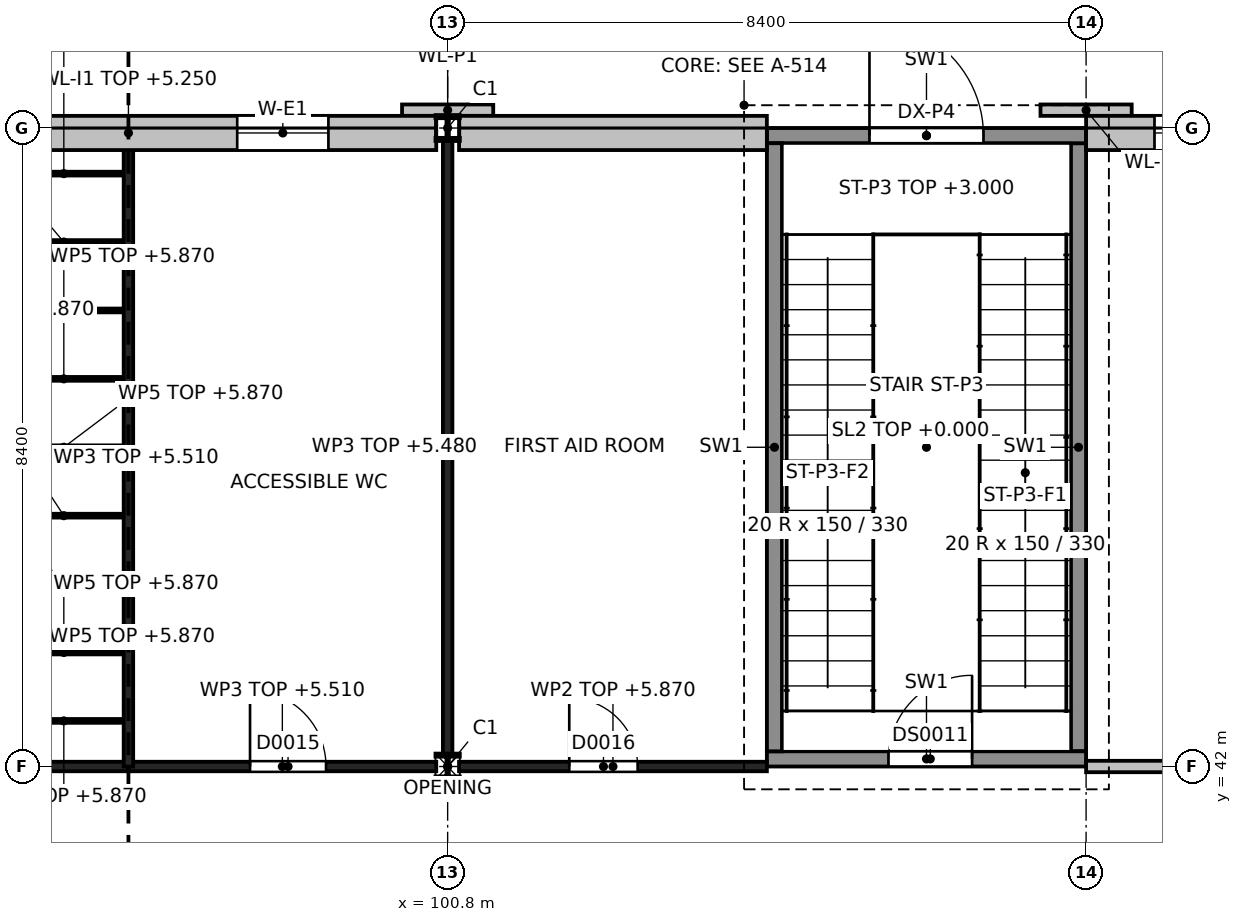
"""IFC4 building model, lengths in metres.
Left out: names, types, materials, properties, quantities, classifications, styles, units other than length and angle.
Written with IfcOpenShell. Run it as: python <this file> out.ifc"""

import sys

from ifc_helpers import new_model, si_unit, direction, frame, frame_2d, origin, origin_2d, place, context, subcontext, project, spatial, rectangle, i_section, extrude, element, fill, save


model = new_model("IFC4")
c1 = context("Model", 3, precision=1e-05, world=origin(), true_north=direction((0.0, 1.0)))
c2 = subcontext(c1, "Body", "Model", "MODEL_VIEW")
j1 = project(units=[si_unit("LENGTHUNIT", "METRE"), si_unit("PLANEANGLEUNIT", "RADIAN")], contexts=[c1])
p1 = place(None, origin())
s1 = spatial("IfcSite", under=j1, at=p1, CompositionType="ELEMENT")
p2 = place(p1, origin())
s2 = spatial("IfcBuilding", under=s1, at=p2, CompositionType="ELEMENT")
p3 = place(p2, origin())
s3 = spatial("IfcBuildingStorey", under=s2, at=p3, CompositionType="ELEMENT", Elevation=0.0)
for number, where, z_axis, x_axis in (
    (1, (100.8, 42.0, -1.35), (0.0, 0.0, 1.0), (1.0, 0.0, 0.0)),
    (2, (100.8, 50.4, -1.35), (0.0, 0.0, 1.0), (1.0, 0.0, 0.0)),
):
    element("IfcColumn", number, at=place(p3, frame(where, z_axis=z_axis, x_axis=x_axis)), inside=s3, PredefinedType="COLUMN", context=c2, shape_type="SweptSolid", body=[
        extrude(i_section(OverallWidth=0.3, OverallDepth=0.32, WebThickness=0.011, FlangeThickness=0.021, at=origin_2d()), origin(), (0.0, 0.0, 1.0), 7.35),
    ])
p4 = place(p3, frame((105.0, 42.1, -1.35), z_axis=(0.0, 0.0, 1.0), x_axis=(1.0, 0.0, 0.0)))
e3 = element("IfcWall", 3, at=p4, inside=s3, PredefinedType="SHEAR", context=c2, shape_type="SweptSolid", body=[
    extrude(rectangle(XDim=4.2, YDim=0.2, at=frame_2d((2.1, 0.0))), origin(), (0.0, 0.0, 1.0), 7.35),
])
p5 = place(p4, frame((1.6, 0.0, 1.35)))
e4 = element("IfcOpeningElement", 4, at=p5, cuts=e3, PredefinedType="OPENING", context=c2, shape_type="SweptSolid", body=[
    extrude(rectangle(XDim=1.1, YDim=2.1, at=frame_2d((0.55, 1.05))), frame((0.0, 0.1, 0.0), z_axis=(0.0, -1.0, 0.0), x_axis=(1.0, 0.0, 0.0)), (0.0, 0.0, 1.0), 0.2),
])
p6 = place(p3, frame((105.0, 50.3, -1.35), z_axis=(0.0, 0.0, 1.0), x_axis=(1.0, 0.0, 0.0)))
e5 = element("IfcWall", 5, at=p6, inside=s3, PredefinedType="SHEAR", context=c2, shape_type="SweptSolid", body=[
    extrude(rectangle(XDim=4.2, YDim=0.2, at=frame_2d((2.1, 0.0))), origin(), (0.0, 0.0, 1.0), 7.35),
])
p7 = place(p6, frame((1.35, 0.0, 1.35)))
e6 = element("IfcOpeningElement", 6, at=p7, cuts=e5, PredefinedType="OPENING", context=c2, shape_type="SweptSolid", body=[
    extrude(rectangle(XDim=1.5, YDim=2.4, at=frame_2d((0.75, 1.2))), frame((0.0, 0.1, 0.0), z_axis=(0.0, -1.0, 0.0), x_axis=(1.0, 0.0, 0.0)), (0.0, 0.0, 1.0), 0.2),
])
for number, where, z_axis, x_axis in (
    (7, (105.1, 42.2, -1.35), (0.0, 0.0, 1.0), (0.0, 1.0, 0.0)),
    (8, (109.1, 42.2, -1.35), (0.0, 0.0, 1.0), (0.0, 1.0, 0.0)),
):
    element("IfcWall", number, at=place(p3, frame(where, z_axis=z_axis, x_axis=x_axis)), inside=s3, PredefinedType="SHEAR", context=c2, shape_type="SweptSolid", body=[
        extrude(rectangle(XDim=8.0, YDim=0.2, at=frame_2d((4.0, 0.0))), origin(), (0.0, 0.0, 1.0), 7.35),
    ])
p8 = place(p3, frame((92.55, 50.335, 0.0), z_axis=(0.0, 0.0, 1.0), x_axis=(1.0, 0.0, 0.0)))
e9 = element("IfcWall", 9, at=p8, inside=s3, PredefinedType="SOLIDWALL", context=c2, shape_type="SweptSolid", body=[
    extrude(rectangle(XDim=8.1, YDim=0.45, at=frame_2d((4.05, 0.0))), origin(), (0.0, 0.0, 1.0), 5.25),
])
p9 = place(p8, frame((1.419, 0.0, 0.9)))
e10 = element("IfcOpeningElement", 10, at=p9, cuts=e9, PredefinedType="OPENING", context=c2, shape_type="SweptSolid", body=[
    extrude(rectangle(XDim=1.2, YDim=3.0, at=frame_2d((0.6, 1.5))), frame((0.0, 0.225, 0.0), z_axis=(0.0, -1.0, 0.0), x_axis=(1.0, 0.0, 0.0)), (0.0, 0.0, 1.0), 0.45),
])
p10 = place(p8, frame((5.481, 0.0, 0.9)))
e11 = element("IfcOpeningElement", 11, at=p10, cuts=e9, PredefinedType="OPENING", context=c2, shape_type="SweptSolid", body=[
    extrude(rectangle(XDim=1.2, YDim=3.0, at=frame_2d((0.6, 1.5))), frame((0.0, 0.225, 0.0), z_axis=(0.0, -1.0, 0.0), x_axis=(1.0, 0.0, 0.0)), (0.0, 0.0, 1.0), 0.45),
])
p11 = place(p3, frame((100.95, 50.335, 0.0), z_axis=(0.0, 0.0, 1.0), x_axis=(1.0, 0.0, 0.0)))
e12 = element("IfcWall", 12, at=p11, inside=s3, PredefinedType="SOLIDWALL", context=c2, shape_type="SweptSolid", body=[
    extrude(rectangle(XDim=4.05, YDim=0.45, at=frame_2d((2.025, 0.0))), origin(), (0.0, 0.0, 1.0), 5.25),
])
p12 = place(p3, frame((109.2, 50.335, 0.0), z_axis=(0.0, 0.0, 1.0), x_axis=(1.0, 0.0, 0.0)))
e13 = element("IfcWall", 13, at=p12, inside=s3, PredefinedType="SOLIDWALL", context=c2, shape_type="SweptSolid", body=[
    extrude(rectangle(XDim=8.25, YDim=0.45, at=frame_2d((4.125, 0.0))), origin(), (0.0, 0.0, 1.0), 5.25),
])
p13 = place(p12, frame((0.9, 0.0, 0.9)))
e14 = element("IfcOpeningElement", 14, at=p13, cuts=e13, PredefinedType="OPENING", context=c2, shape_type="SweptSolid", body=[
    extrude(rectangle(XDim=3.0, YDim=3.6, at=frame_2d((1.5, 1.8))), frame((0.0, 0.225, 0.0), z_axis=(0.0, -1.0, 0.0), x_axis=(1.0, 0.0, 0.0)), (0.0, 0.0, 1.0), 0.45),
])
p14 = place(p12, frame((4.5, 0.0, 0.9)))
e15 = element("IfcOpeningElement", 15, at=p14, cuts=e13, PredefinedType="OPENING", context=c2, shape_type="SweptSolid", body=[
    extrude(rectangle(XDim=3.0, YDim=3.6, at=frame_2d((1.5, 1.8))), frame((0.0, 0.225, 0.0), z_axis=(0.0, -1.0, 0.0), x_axis=(1.0, 0.0, 0.0)), (0.0, 0.0, 1.0), 0.45),
])
for number, where, z_axis, x_axis in (
    (16, (100.2, 50.635, 0.0), (0.0, 0.0, 1.0), (1.0, 0.0, 0.0)),
    (17, (108.6, 50.635, 0.0), (0.0, 0.0, 1.0), (1.0, 0.0, 0.0)),
):
    element("IfcWall", number, at=place(p3, frame(where, z_axis=z_axis, x_axis=x_axis)), inside=s3, PredefinedType="SOLIDWALL", context=c2, shape_type="SweptSolid", body=[
        extrude(rectangle(XDim=1.2, YDim=0.15, at=frame_2d((0.6, 0.0))), origin(), (0.0, 0.0, 1.0), 6.0),
    ])
p15 = place(p3, frame((92.55, 42.0, 0.0), z_axis=(0.0, 0.0, 1.0), x_axis=(1.0, 0.0, 0.0)))
e18 = element("IfcWall", 18, at=p15, inside=s3, PredefinedType="PARTITIONING", context=c2, shape_type="SweptSolid", body=[
    extrude(rectangle(XDim=4.05, YDim=0.125, at=frame_2d((2.025, 0.0))), origin(), (0.0, 0.0, 1.0), 5.51),
])
p16 = place(p15, frame((1.45, 0.0, 0.0)))
e19 = element("IfcOpeningElement", 19, at=p16, cuts=e18, PredefinedType="OPENING", context=c2, shape_type="SweptSolid", body=[
    extrude(rectangle(XDim=0.9, YDim=2.1, at=frame_2d((0.45, 1.05))), frame((0.0, 0.062, 0.0), z_axis=(0.0, -1.0, 0.0), x_axis=(1.0, 0.0, 0.0)), (0.0, 0.0, 1.0), 0.125),
])
p17 = place(p3, frame((96.6, 42.0, 0.0), z_axis=(0.0, 0.0, 1.0), x_axis=(1.0, 0.0, 0.0)))
e20 = element("IfcWall", 20, at=p17, inside=s3, PredefinedType="PARTITIONING", context=c2, shape_type="SweptSolid", body=[
    extrude(rectangle(XDim=4.05, YDim=0.125, at=frame_2d((2.025, 0.0))), origin(), (0.0, 0.0, 1.0), 5.51),
])
p18 = place(p17, frame((1.6, 0.0, 0.0)))
e21 = element("IfcOpeningElement", 21, at=p18, cuts=e20, PredefinedType="OPENING", context=c2, shape_type="SweptSolid", body=[
    extrude(rectangle(XDim=1.0, YDim=2.1, at=frame_2d((0.5, 1.05))), frame((0.0, 0.062, 0.0), z_axis=(0.0, -1.0, 0.0), x_axis=(1.0, 0.0, 0.0)), (0.0, 0.0, 1.0), 0.125),
])
p19 = place(p3, frame((100.95, 42.0, 0.0), z_axis=(0.0, 0.0, 1.0), x_axis=(1.0, 0.0, 0.0)))
e22 = element("IfcWall", 22, at=p19, inside=s3, PredefinedType="PARTITIONING", context=c2, shape_type="SweptSolid", body=[
    extrude(rectangle(XDim=4.05, YDim=0.125, at=frame_2d((2.025, 0.0))), origin(), (0.0, 0.0, 1.0), 5.87),
])
p20 = place(p19, frame((1.45, 0.0, 0.0)))
e23 = element("IfcOpeningElement", 23, at=p20, cuts=e22, PredefinedType="OPENING", context=c2, shape_type="SweptSolid", body=[
    extrude(rectangle(XDim=0.9, YDim=2.1, at=frame_2d((0.45, 1.05))), frame((0.0, 0.062, 0.0), z_axis=(0.0, -1.0, 0.0), x_axis=(1.0, 0.0, 0.0)), (0.0, 0.0, 1.0), 0.125),
])
p21 = place(p3, frame((109.2, 42.0, 0.0), z_axis=(0.0, 0.0, 1.0), x_axis=(1.0, 0.0, 0.0)))
e24 = element("IfcWall", 24, at=p21, inside=s3, PredefinedType="PARTITIONING", context=c2, shape_type="SweptSolid", body=[
    extrude(rectangle(XDim=8.25, YDim=0.15, at=frame_2d((4.125, 0.0))), origin(), (0.0, 0.0, 1.0), 5.48),
])
p22 = place(p21, frame((3.7, 0.0, 0.0)))
e25 = element("IfcOpeningElement", 25, at=p22, cuts=e24, PredefinedType="OPENING", context=c2, shape_type="SweptSolid", body=[
    extrude(rectangle(XDim=0.9, YDim=2.1, at=frame_2d((0.45, 1.05))), frame((0.0, 0.075, 0.0), z_axis=(0.0, -1.0, 0.0), x_axis=(1.0, 0.0, 0.0)), (0.0, 0.0, 1.0), 0.15),
])
p23 = place(p3, frame((96.6, 42.0, 0.0), z_axis=(0.0, 0.0, 1.0), x_axis=(0.0, 1.0, 0.0)))
e26 = element("IfcWall", 26, at=p23, inside=s3, PredefinedType="PARTITIONING", context=c2, shape_type="SweptSolid", body=[
    extrude(rectangle(XDim=8.11, YDim=0.125, at=frame_2d((4.055, 0.0))), origin(), (0.0, 0.0, 1.0), 5.51),
])
p24 = place(p3, frame((100.8, 42.16, 0.0), z_axis=(0.0, 0.0, 1.0), x_axis=(0.0, 1.0, 0.0)))
e27 = element("IfcWall", 27, at=p24, inside=s3, PredefinedType="PARTITIONING", context=c2, shape_type="SweptSolid", body=[
    extrude(rectangle(XDim=8.08, YDim=0.125, at=frame_2d((4.04, 0.0))), origin(), (0.0, 0.0, 1.0), 5.48),
])
for number, where, z_axis, x_axis in (
    (28, (96.6, 42.6, 0.0), (0.0, 0.0, 1.0), (-1.0, 0.0, 0.0)),
    (29, (96.6, 43.5, 0.0), (0.0, 0.0, 1.0), (-1.0, 0.0, 0.0)),
    (30, (96.6, 44.4, 0.0), (0.0, 0.0, 1.0), (-1.0, 0.0, 0.0)),
    (31, (96.6, 45.3, 0.0), (0.0, 0.0, 1.0), (-1.0, 0.0, 0.0)),
    (32, (96.6, 46.2, 0.0), (0.0, 0.0, 1.0), (-1.0, 0.0, 0.0)),
    (33, (96.6, 47.1, 0.0), (0.0, 0.0, 1.0), (-1.0, 0.0, 0.0)),
    (34, (96.6, 48.0, 0.0), (0.0, 0.0, 1.0), (-1.0, 0.0, 0.0)),
    (35, (96.6, 48.9, 0.0), (0.0, 0.0, 1.0), (-1.0, 0.0, 0.0)),
    (36, (96.6, 49.8, 0.0), (0.0, 0.0, 1.0), (-1.0, 0.0, 0.0)),
):
    element("IfcWall", number, at=place(p3, frame(where, z_axis=z_axis, x_axis=x_axis)), inside=s3, PredefinedType="PARTITIONING", context=c2, shape_type="SweptSolid", body=[
        extrude(rectangle(XDim=1.7, YDim=0.05, at=frame_2d((0.85, 0.0))), origin(), (0.0, 0.0, 1.0), 5.87),
    ])
p25 = place(p10, origin())
e37 = element("IfcWindow", 37, at=p25, inside=s3, PartitioningType="SINGLE_PANEL", PredefinedType="WINDOW", context=c2, shape_type="SweptSolid", body=[
    extrude(rectangle(XDim=1.2, YDim=3.0, at=frame_2d((0.6, 1.5))), frame((0.0, 0.03, 0.0), z_axis=(0.0, -1.0, 0.0), x_axis=(1.0, 0.0, 0.0)), (0.0, 0.0, 1.0), 0.06),
])
fill(e11, e37)
p26 = place(p7, origin())
e38 = element("IfcDoor", 38, at=p26, inside=s3, OperationType="DOUBLE_DOOR_SINGLE_SWING", PredefinedType="DOOR", context=c2, shape_type="SweptSolid", body=[
    extrude(rectangle(XDim=1.5, YDim=2.4, at=frame_2d((0.75, 1.2))), frame((0.0, 0.025, 0.0), z_axis=(0.0, -1.0, 0.0), x_axis=(1.0, 0.0, 0.0)), (0.0, 0.0, 1.0), 0.05),
])
fill(e6, e38)
p27 = place(p13, origin())
e39 = element("IfcWindow", 39, at=p27, inside=s3, PartitioningType="SINGLE_PANEL", PredefinedType="WINDOW", context=c2, shape_type="SweptSolid", body=[
    extrude(rectangle(XDim=3.0, YDim=3.6, at=frame_2d((1.5, 1.8))), frame((0.0, 0.03, 0.0), z_axis=(0.0, -1.0, 0.0), x_axis=(1.0, 0.0, 0.0)), (0.0, 0.0, 1.0), 0.06),
])
fill(e14, e39)
p28 = place(p18, origin())
e40 = element("IfcDoor", 40, at=p28, inside=s3, OperationType="SINGLE_SWING_LEFT", PredefinedType="DOOR", context=c2, shape_type="SweptSolid", body=[
    extrude(rectangle(XDim=1.0, YDim=2.1, at=frame_2d((0.5, 1.05))), frame((0.0, 0.025, 0.0), z_axis=(0.0, -1.0, 0.0), x_axis=(1.0, 0.0, 0.0)), (0.0, 0.0, 1.0), 0.05),
])
fill(e21, e40)
p29 = place(p20, origin())
e41 = element("IfcDoor", 41, at=p29, inside=s3, OperationType="SINGLE_SWING_LEFT", PredefinedType="DOOR", context=c2, shape_type="SweptSolid", body=[
    extrude(rectangle(XDim=0.9, YDim=2.1, at=frame_2d((0.45, 1.05))), frame((0.0, 0.025, 0.0), z_axis=(0.0, -1.0, 0.0), x_axis=(1.0, 0.0, 0.0)), (0.0, 0.0, 1.0), 0.05),
])
fill(e23, e41)
p30 = place(p5, frame((1.1, 0.05, 0.0), z_axis=(0.0, 0.0, 1.0), x_axis=(-1.0, 0.0, 0.0)))
e42 = element("IfcDoor", 42, at=p30, inside=s3, OperationType="SINGLE_SWING_RIGHT", PredefinedType="DOOR", context=c2, shape_type="SweptSolid", body=[
    extrude(rectangle(XDim=1.1, YDim=2.1, at=frame_2d((0.55, 1.05))), frame((0.0, 0.025, 0.0), z_axis=(0.0, -1.0, 0.0), x_axis=(1.0, 0.0, 0.0)), (0.0, 0.0, 1.0), 0.05),
])
fill(e4, e42)
save(model, sys.argv[1])
